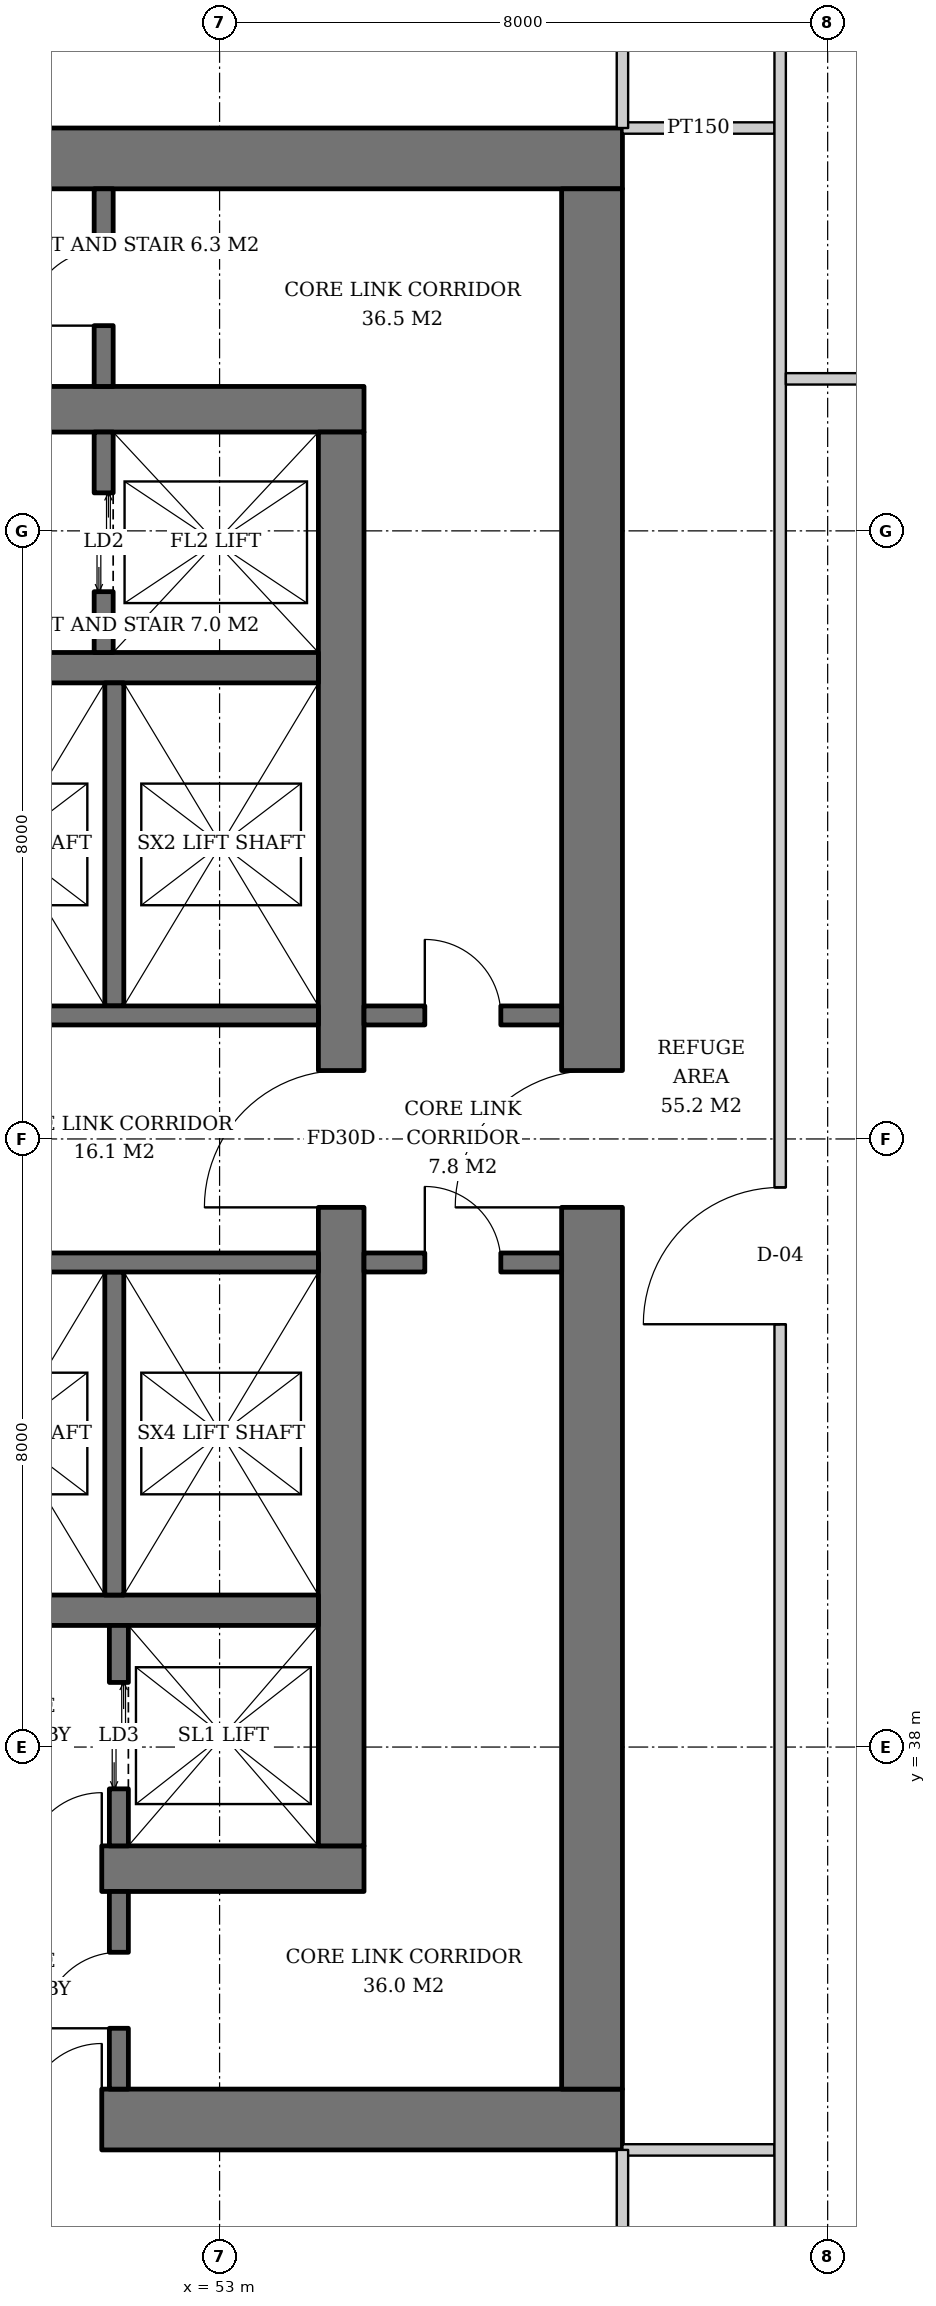
"""IFC4 building model, lengths in metres.
Left out: names, types, materials, properties, quantities, classifications, styles, units other than length and angle.
Written with IfcOpenShell. Run it as: python <this file> out.ifc"""

import sys

from ifc_helpers import new_model, si_unit, direction, frame, frame_2d, origin, place, context, subcontext, project, spatial, rectangle, extrude, element, fill, save


model = new_model("IFC4")
c1 = context("Model", 3, precision=1e-05, world=origin(), true_north=direction((0.0, 1.0)))
c2 = subcontext(c1, "Body", "Model", "MODEL_VIEW")
j1 = project(units=[si_unit("LENGTHUNIT", "METRE"), si_unit("PLANEANGLEUNIT", "RADIAN")], contexts=[c1])
p1 = place(None, origin())
s1 = spatial("IfcSite", under=j1, at=p1, CompositionType="ELEMENT")
p2 = place(p1, origin())
s2 = spatial("IfcBuilding", under=s1, at=p2, CompositionType="ELEMENT")
p3 = place(p2, frame((0.0, 0.0, 85.6)))
s3 = spatial("IfcBuildingStorey", under=s2, at=p3, CompositionType="ELEMENT", Elevation=85.6)
p4 = place(p3, frame((35.1, 36.4, 0.0), z_axis=(0.0, 0.0, 1.0), x_axis=(1.0, 0.0, 0.0)))
e1 = element("IfcWall", 1, at=p4, inside=s3, PredefinedType="SHEAR", context=c2, shape_type="SweptSolid", body=[
    extrude(rectangle(XDim=19.8, YDim=0.6, at=frame_2d((9.9, 0.0))), origin(), (0.0, 0.0, 1.0), 3.8),
])
p5 = place(p4, frame((3.9, 0.0, 0.0)))
e2 = element("IfcOpeningElement", 2, at=p5, cuts=e1, PredefinedType="OPENING", context=c2, shape_type="SweptSolid", body=[
    extrude(rectangle(XDim=1.0, YDim=2.1, at=frame_2d((0.5, 1.05))), frame((0.0, 0.31, 0.0), z_axis=(0.0, -1.0, 0.0), x_axis=(1.0, 0.0, 0.0)), (0.0, 0.0, 1.0), 0.62),
])
p6 = place(p4, frame((15.35, 0.0, 0.0)))
e3 = element("IfcOpeningElement", 3, at=p6, cuts=e1, PredefinedType="OPENING", context=c2, shape_type="SweptSolid", body=[
    extrude(rectangle(XDim=1.0, YDim=2.1, at=frame_2d((0.5, 1.05))), frame((0.0, 0.31, 0.0), z_axis=(0.0, -1.0, 0.0), x_axis=(1.0, 0.0, 0.0)), (0.0, 0.0, 1.0), 0.62),
])
p7 = place(p3, frame((35.1, 55.6, 0.0), z_axis=(0.0, 0.0, 1.0), x_axis=(1.0, 0.0, 0.0)))
e4 = element("IfcWall", 4, at=p7, inside=s3, PredefinedType="SHEAR", context=c2, shape_type="SweptSolid", body=[
    extrude(rectangle(XDim=19.8, YDim=0.6, at=frame_2d((9.9, 0.0))), origin(), (0.0, 0.0, 1.0), 3.8),
])
p8 = place(p7, frame((14.54, 0.0, 0.0)))
e5 = element("IfcOpeningElement", 5, at=p8, cuts=e4, PredefinedType="OPENING", context=c2, shape_type="SweptSolid", body=[
    extrude(rectangle(XDim=1.0, YDim=2.1, at=frame_2d((0.5, 1.05))), frame((0.0, 0.31, 0.0), z_axis=(0.0, -1.0, 0.0), x_axis=(1.0, 0.0, 0.0)), (0.0, 0.0, 1.0), 0.62),
])
p9 = place(p7, frame((2.425, 0.0, 0.0)))
e6 = element("IfcOpeningElement", 6, at=p9, cuts=e4, PredefinedType="OPENING", context=c2, shape_type="SweptSolid", body=[
    extrude(rectangle(XDim=1.0, YDim=2.1, at=frame_2d((0.5, 1.05))), frame((0.0, 0.31, 0.0), z_axis=(0.0, -1.0, 0.0), x_axis=(1.0, 0.0, 0.0)), (0.0, 0.0, 1.0), 0.62),
])
p10 = place(p3, frame((54.6, 36.7, 0.0), z_axis=(0.0, 0.0, 1.0), x_axis=(0.0, 1.0, 0.0)))
e7 = element("IfcWall", 7, at=p10, inside=s3, PredefinedType="SHEAR", context=c2, shape_type="SweptSolid", body=[
    extrude(rectangle(XDim=18.6, YDim=0.6, at=frame_2d((9.3, 0.0))), origin(), (0.0, 0.0, 1.0), 3.8),
])
p11 = place(p10, frame((8.4, 0.0, 0.0)))
e8 = element("IfcOpeningElement", 8, at=p11, cuts=e7, PredefinedType="OPENING", context=c2, shape_type="SweptSolid", body=[
    extrude(rectangle(XDim=1.8, YDim=2.4, at=frame_2d((0.9, 1.2))), frame((0.0, 0.31, 0.0), z_axis=(0.0, -1.0, 0.0), x_axis=(1.0, 0.0, 0.0)), (0.0, 0.0, 1.0), 0.62),
])
p12 = place(p3, frame((31.7, 33.1, 0.0), z_axis=(0.0, 0.0, 1.0), x_axis=(1.0, 0.0, 0.0)))
e9 = element("IfcWall", 9, at=p12, inside=s3, PredefinedType="SHEAR", context=c2, shape_type="SweptSolid", body=[
    extrude(rectangle(XDim=26.6, YDim=0.8, at=frame_2d((13.3, 0.0))), origin(), (0.0, 0.0, 1.0), 3.8),
])
p13 = place(p12, frame((7.3, 0.0, 0.0)))
e10 = element("IfcOpeningElement", 10, at=p13, cuts=e9, PredefinedType="OPENING", context=c2, shape_type="SweptSolid", body=[
    extrude(rectangle(XDim=1.0, YDim=2.1, at=frame_2d((0.5, 1.05))), frame((0.0, 0.41, 0.0), z_axis=(0.0, -1.0, 0.0), x_axis=(1.0, 0.0, 0.0)), (0.0, 0.0, 1.0), 0.82),
])
p14 = place(p12, frame((18.75, 0.0, 0.0)))
e11 = element("IfcOpeningElement", 11, at=p14, cuts=e9, PredefinedType="OPENING", context=c2, shape_type="SweptSolid", body=[
    extrude(rectangle(XDim=1.0, YDim=2.1, at=frame_2d((0.5, 1.05))), frame((0.0, 0.41, 0.0), z_axis=(0.0, -1.0, 0.0), x_axis=(1.0, 0.0, 0.0)), (0.0, 0.0, 1.0), 0.82),
])
p15 = place(p12, frame((1.9, 0.0, 0.0)))
e12 = element("IfcOpeningElement", 12, at=p15, cuts=e9, PredefinedType="OPENING", context=c2, shape_type="SweptSolid", body=[
    extrude(rectangle(XDim=1.0, YDim=2.1, at=frame_2d((0.5, 1.05))), frame((0.0, 0.41, 0.0), z_axis=(0.0, -1.0, 0.0), x_axis=(1.0, 0.0, 0.0)), (0.0, 0.0, 1.0), 0.82),
])
p16 = place(p12, frame((4.725, 0.0, 0.0)))
e13 = element("IfcOpeningElement", 13, at=p16, cuts=e9, PredefinedType="OPENING", context=c2, shape_type="SweptSolid", body=[
    extrude(rectangle(XDim=1.0, YDim=2.1, at=frame_2d((0.5, 1.05))), frame((0.0, 0.41, 0.0), z_axis=(0.0, -1.0, 0.0), x_axis=(1.0, 0.0, 0.0)), (0.0, 0.0, 1.0), 0.82),
])
p17 = place(p3, frame((31.7, 58.9, 0.0), z_axis=(0.0, 0.0, 1.0), x_axis=(1.0, 0.0, 0.0)))
e14 = element("IfcWall", 14, at=p17, inside=s3, PredefinedType="SHEAR", context=c2, shape_type="SweptSolid", body=[
    extrude(rectangle(XDim=26.6, YDim=0.8, at=frame_2d((13.3, 0.0))), origin(), (0.0, 0.0, 1.0), 3.8),
])
p18 = place(p17, frame((17.94, 0.0, 0.0)))
e15 = element("IfcOpeningElement", 15, at=p18, cuts=e14, PredefinedType="OPENING", context=c2, shape_type="SweptSolid", body=[
    extrude(rectangle(XDim=1.0, YDim=2.1, at=frame_2d((0.5, 1.05))), frame((0.0, 0.41, 0.0), z_axis=(0.0, -1.0, 0.0), x_axis=(1.0, 0.0, 0.0)), (0.0, 0.0, 1.0), 0.82),
])
p19 = place(p17, frame((5.825, 0.0, 0.0)))
e16 = element("IfcOpeningElement", 16, at=p19, cuts=e14, PredefinedType="OPENING", context=c2, shape_type="SweptSolid", body=[
    extrude(rectangle(XDim=1.0, YDim=2.1, at=frame_2d((0.5, 1.05))), frame((0.0, 0.41, 0.0), z_axis=(0.0, -1.0, 0.0), x_axis=(1.0, 0.0, 0.0)), (0.0, 0.0, 1.0), 0.82),
])
p20 = place(p17, frame((2.637, 0.0, 0.0)))
e17 = element("IfcOpeningElement", 17, at=p20, cuts=e14, PredefinedType="OPENING", context=c2, shape_type="SweptSolid", body=[
    extrude(rectangle(XDim=1.0, YDim=2.1, at=frame_2d((0.5, 1.05))), frame((0.0, 0.41, 0.0), z_axis=(0.0, -1.0, 0.0), x_axis=(1.0, 0.0, 0.0)), (0.0, 0.0, 1.0), 0.82),
])
p21 = place(p3, frame((57.9, 33.5, 0.0), z_axis=(0.0, 0.0, 1.0), x_axis=(0.0, 1.0, 0.0)))
e18 = element("IfcWall", 18, at=p21, inside=s3, PredefinedType="SHEAR", context=c2, shape_type="SweptSolid", body=[
    extrude(rectangle(XDim=25.0, YDim=0.8, at=frame_2d((12.5, 0.0))), origin(), (0.0, 0.0, 1.0), 3.8),
])
p22 = place(p21, frame((11.6, 0.0, 0.0)))
e19 = element("IfcOpeningElement", 19, at=p22, cuts=e18, PredefinedType="OPENING", context=c2, shape_type="SweptSolid", body=[
    extrude(rectangle(XDim=1.8, YDim=2.4, at=frame_2d((0.9, 1.2))), frame((0.0, 0.41, 0.0), z_axis=(0.0, -1.0, 0.0), x_axis=(1.0, 0.0, 0.0)), (0.0, 0.0, 1.0), 0.82),
])
for number, where, z_axis, x_axis in (
    (20, (35.7, 39.8, 0.0), (0.0, 0.0, 1.0), (1.0, 0.0, 0.0)),
    (21, (35.7, 52.2, 0.0), (0.0, 0.0, 1.0), (1.0, 0.0, 0.0)),
):
    element("IfcWall", number, at=place(p3, frame(where, z_axis=z_axis, x_axis=x_axis)), inside=s3, PredefinedType="SHEAR", context=c2, shape_type="SweptSolid", body=[
        extrude(rectangle(XDim=18.6, YDim=0.4, at=frame_2d((9.3, 0.0))), origin(), (0.0, 0.0, 1.0), 3.8),
    ])
p23 = place(p3, frame((51.675, 36.7, 0.0), z_axis=(0.0, 0.0, 1.0), x_axis=(0.0, 1.0, 0.0)))
e22 = element("IfcWall", 22, at=p23, inside=s3, PredefinedType="SHEAR", context=c2, shape_type="SweptSolid", body=[
    extrude(rectangle(XDim=2.9, YDim=0.25, at=frame_2d((1.45, 0.0))), origin(), (0.0, 0.0, 1.0), 3.8),
])
p24 = place(p23, frame((0.75, 0.0, 0.0)))
e23 = element("IfcOpeningElement", 23, at=p24, cuts=e22, PredefinedType="OPENING", context=c2, shape_type="SweptSolid", body=[
    extrude(rectangle(XDim=1.4, YDim=2.4, at=frame_2d((0.7, 1.2))), frame((0.0, 0.135, 0.0), z_axis=(0.0, -1.0, 0.0), x_axis=(1.0, 0.0, 0.0)), (0.0, 0.0, 1.0), 0.27),
])
p25 = place(p3, frame((51.475, 52.4, 0.0), z_axis=(0.0, 0.0, 1.0), x_axis=(0.0, 1.0, 0.0)))
e24 = element("IfcWall", 24, at=p25, inside=s3, PredefinedType="SHEAR", context=c2, shape_type="SweptSolid", body=[
    extrude(rectangle(XDim=2.9, YDim=0.25, at=frame_2d((1.45, 0.0))), origin(), (0.0, 0.0, 1.0), 3.8),
])
p26 = place(p25, frame((0.8, 0.0, 0.0)))
e25 = element("IfcOpeningElement", 25, at=p26, cuts=e24, PredefinedType="OPENING", context=c2, shape_type="SweptSolid", body=[
    extrude(rectangle(XDim=1.3, YDim=2.2, at=frame_2d((0.65, 1.1))), frame((0.0, 0.135, 0.0), z_axis=(0.0, -1.0, 0.0), x_axis=(1.0, 0.0, 0.0)), (0.0, 0.0, 1.0), 0.27),
])
p27 = place(p3, frame((51.615, 47.75, 0.0), z_axis=(0.0, 0.0, 1.0), x_axis=(0.0, 1.0, 0.0)))
e26 = element("IfcWall", 26, at=p27, inside=s3, PredefinedType="SHEAR", context=c2, shape_type="SweptSolid", body=[
    extrude(rectangle(XDim=4.25, YDim=0.25, at=frame_2d((2.125, 0.0))), origin(), (0.0, 0.0, 1.0), 3.8),
])
p28 = place(p3, frame((48.93, 47.625, 0.0), z_axis=(0.0, 0.0, 1.0), x_axis=(1.0, 0.0, 0.0)))
e27 = element("IfcWall", 27, at=p28, inside=s3, PredefinedType="SHEAR", context=c2, shape_type="SweptSolid", body=[
    extrude(rectangle(XDim=5.37, YDim=0.25, at=frame_2d((2.685, 0.0))), origin(), (0.0, 0.0, 1.0), 3.8),
])
p29 = place(p3, frame((51.615, 44.25, 0.0), z_axis=(0.0, 0.0, 1.0), x_axis=(0.0, -1.0, 0.0)))
e28 = element("IfcWall", 28, at=p29, inside=s3, PredefinedType="SHEAR", context=c2, shape_type="SweptSolid", body=[
    extrude(rectangle(XDim=4.25, YDim=0.25, at=frame_2d((2.125, 0.0))), origin(), (0.0, 0.0, 1.0), 3.8),
])
p30 = place(p3, frame((48.93, 44.375, 0.0), z_axis=(0.0, 0.0, 1.0), x_axis=(1.0, 0.0, 0.0)))
e29 = element("IfcWall", 29, at=p30, inside=s3, PredefinedType="SHEAR", context=c2, shape_type="SweptSolid", body=[
    extrude(rectangle(XDim=5.37, YDim=0.25, at=frame_2d((2.685, 0.0))), origin(), (0.0, 0.0, 1.0), 3.8),
])
p31 = place(p3, frame((51.475, 55.9, 0.0), z_axis=(0.0, 0.0, 1.0), x_axis=(0.0, 1.0, 0.0)))
e30 = element("IfcWall", 30, at=p31, inside=s3, PredefinedType="SOLIDWALL", context=c2, shape_type="SweptSolid", body=[
    extrude(rectangle(XDim=2.6, YDim=0.25, at=frame_2d((1.3, 0.0))), origin(), (0.0, 0.0, 1.0), 3.6),
])
p32 = place(p31, frame((0.8, 0.0, 0.0)))
e31 = element("IfcOpeningElement", 31, at=p32, cuts=e30, PredefinedType="OPENING", context=c2, shape_type="SweptSolid", body=[
    extrude(rectangle(XDim=1.0, YDim=2.1, at=frame_2d((0.5, 1.05))), frame((0.0, 0.135, 0.0), z_axis=(0.0, -1.0, 0.0), x_axis=(1.0, 0.0, 0.0)), (0.0, 0.0, 1.0), 0.27),
])
p33 = place(p3, frame((54.9, 44.375, 0.0), z_axis=(0.0, 0.0, 1.0), x_axis=(1.0, 0.0, 0.0)))
e32 = element("IfcWall", 32, at=p33, inside=s3, PredefinedType="SOLIDWALL", context=c2, shape_type="SweptSolid", body=[
    extrude(rectangle(XDim=2.6, YDim=0.25, at=frame_2d((1.3, 0.0))), origin(), (0.0, 0.0, 1.0), 3.6),
])
p34 = place(p33, frame((0.8, 0.0, 0.0)))
e33 = element("IfcOpeningElement", 33, at=p34, cuts=e32, PredefinedType="OPENING", context=c2, shape_type="SweptSolid", body=[
    extrude(rectangle(XDim=1.0, YDim=2.1, at=frame_2d((0.5, 1.05))), frame((0.0, 0.135, 0.0), z_axis=(0.0, -1.0, 0.0), x_axis=(1.0, 0.0, 0.0)), (0.0, 0.0, 1.0), 0.27),
])
p35 = place(p3, frame((54.9, 47.625, 0.0), z_axis=(0.0, 0.0, 1.0), x_axis=(1.0, 0.0, 0.0)))
e34 = element("IfcWall", 34, at=p35, inside=s3, PredefinedType="SOLIDWALL", context=c2, shape_type="SweptSolid", body=[
    extrude(rectangle(XDim=2.6, YDim=0.25, at=frame_2d((1.3, 0.0))), origin(), (0.0, 0.0, 1.0), 3.6),
])
p36 = place(p35, frame((0.8, 0.0, 0.0)))
e35 = element("IfcOpeningElement", 35, at=p36, cuts=e34, PredefinedType="OPENING", context=c2, shape_type="SweptSolid", body=[
    extrude(rectangle(XDim=1.0, YDim=2.1, at=frame_2d((0.5, 1.05))), frame((0.0, 0.135, 0.0), z_axis=(0.0, -1.0, 0.0), x_axis=(1.0, 0.0, 0.0)), (0.0, 0.0, 1.0), 0.27),
])
p37 = place(p3, frame((51.675, 33.5, 0.0), z_axis=(0.0, 0.0, 1.0), x_axis=(0.0, 1.0, 0.0)))
e36 = element("IfcWall", 36, at=p37, inside=s3, PredefinedType="SOLIDWALL", context=c2, shape_type="SweptSolid", body=[
    extrude(rectangle(XDim=2.6, YDim=0.25, at=frame_2d((1.3, 0.0))), origin(), (0.0, 0.0, 1.0), 3.6),
])
p38 = place(p37, frame((0.8, 0.0, 0.0)))
e37 = element("IfcOpeningElement", 37, at=p38, cuts=e36, PredefinedType="OPENING", context=c2, shape_type="SweptSolid", body=[
    extrude(rectangle(XDim=1.0, YDim=2.1, at=frame_2d((0.5, 1.05))), frame((0.0, 0.135, 0.0), z_axis=(0.0, -1.0, 0.0), x_axis=(1.0, 0.0, 0.0)), (0.0, 0.0, 1.0), 0.27),
])
p39 = place(p3, frame((58.3, 59.3, 0.0), z_axis=(0.0, 0.0, 1.0), x_axis=(1.0, 0.0, 0.0)))
e38 = element("IfcWall", 38, at=p39, inside=s3, PredefinedType="PARTITIONING", context=c2, shape_type="SweptSolid", body=[
    extrude(rectangle(XDim=2.0, YDim=0.15, at=frame_2d((1.0, 0.0))), origin(), (0.0, 0.0, 1.0), 3.6),
])
p40 = place(p3, frame((58.3, 32.7, 0.0), z_axis=(0.0, 0.0, 1.0), x_axis=(1.0, 0.0, 0.0)))
e39 = element("IfcWall", 39, at=p40, inside=s3, PredefinedType="PARTITIONING", context=c2, shape_type="SweptSolid", body=[
    extrude(rectangle(XDim=2.0, YDim=0.15, at=frame_2d((1.0, 0.0))), origin(), (0.0, 0.0, 1.0), 2.592),
])
p41 = place(p3, frame((60.375, 30.55, 0.0), z_axis=(0.0, 0.0, 1.0), x_axis=(0.0, 1.0, 0.0)))
e40 = element("IfcWall", 40, at=p41, inside=s3, PredefinedType="PARTITIONING", context=c2, shape_type="SweptSolid", body=[
    extrude(rectangle(XDim=30.75, YDim=0.15, at=frame_2d((15.375, 0.0))), origin(), (0.0, 0.0, 1.0), 2.592),
])
p42 = place(p41, frame((13.012, 0.0, 0.0)))
e41 = element("IfcOpeningElement", 41, at=p42, cuts=e40, PredefinedType="OPENING", context=c2, shape_type="SweptSolid", body=[
    extrude(rectangle(XDim=1.8, YDim=2.4, at=frame_2d((0.9, 1.2))), frame((0.0, 0.085, 0.0), z_axis=(0.0, -1.0, 0.0), x_axis=(1.0, 0.0, 0.0)), (0.0, 0.0, 1.0), 0.17),
])
p43 = place(p3, frame((60.45, 56.0, 0.0), z_axis=(0.0, 0.0, 1.0), x_axis=(1.0, 0.0, 0.0)))
e42 = element("IfcWall", 42, at=p43, inside=s3, PredefinedType="PARTITIONING", context=c2, shape_type="SweptSolid", body=[
    extrude(rectangle(XDim=5.798, YDim=0.15, at=frame_2d((2.899, 0.0))), origin(), (0.0, 0.0, 1.0), 3.6),
])
p44 = place(p3, frame((58.3, 59.3, 0.0), z_axis=(0.0, 0.0, 1.0), x_axis=(0.0, 1.0, 0.0)))
e43 = element("IfcWall", 43, at=p44, inside=s3, PredefinedType="PARTITIONING", context=c2, shape_type="SweptSolid", body=[
    extrude(rectangle(XDim=2.0, YDim=0.15, at=frame_2d((1.0, 0.0))), origin(), (0.0, 0.0, 1.0), 2.592),
])
p45 = place(p3, frame((58.3, 32.7, 0.0), z_axis=(0.0, 0.0, 1.0), x_axis=(0.0, -1.0, 0.0)))
e44 = element("IfcWall", 44, at=p45, inside=s3, PredefinedType="PARTITIONING", context=c2, shape_type="SweptSolid", body=[
    extrude(rectangle(XDim=2.0, YDim=0.15, at=frame_2d((1.0, 0.0))), origin(), (0.0, 0.0, 1.0), 3.6),
])
p46 = place(p24, origin())
e45 = element("IfcDoor", 45, at=p46, inside=s3, OperationType="DOUBLE_DOOR_SLIDING", PredefinedType="DOOR", context=c2, shape_type="SweptSolid", body=[
    extrude(rectangle(XDim=1.4, YDim=2.4, at=frame_2d((0.7, 1.2))), frame((0.0, 0.025, 0.0), z_axis=(0.0, -1.0, 0.0), x_axis=(1.0, 0.0, 0.0)), (0.0, 0.0, 1.0), 0.05),
])
fill(e23, e45)
p47 = place(p26, origin())
e46 = element("IfcDoor", 46, at=p47, inside=s3, OperationType="DOUBLE_DOOR_SLIDING", PredefinedType="DOOR", context=c2, shape_type="SweptSolid", body=[
    extrude(rectangle(XDim=1.3, YDim=2.2, at=frame_2d((0.65, 1.1))), frame((0.0, 0.025, 0.0), z_axis=(0.0, -1.0, 0.0), x_axis=(1.0, 0.0, 0.0)), (0.0, 0.0, 1.0), 0.05),
])
fill(e25, e46)
p48 = place(p32, origin())
e47 = element("IfcDoor", 47, at=p48, inside=s3, OperationType="SINGLE_SWING_LEFT", PredefinedType="DOOR", context=c2, shape_type="SweptSolid", body=[
    extrude(rectangle(XDim=1.0, YDim=2.1, at=frame_2d((0.5, 1.05))), frame((0.0, 0.025, 0.0), z_axis=(0.0, -1.0, 0.0), x_axis=(1.0, 0.0, 0.0)), (0.0, 0.0, 1.0), 0.05),
])
fill(e31, e47)
p49 = place(p34, origin())
e48 = element("IfcDoor", 48, at=p49, inside=s3, OperationType="SINGLE_SWING_LEFT", PredefinedType="DOOR", context=c2, shape_type="SweptSolid", body=[
    extrude(rectangle(XDim=1.0, YDim=2.1, at=frame_2d((0.5, 1.05))), frame((0.0, 0.025, 0.0), z_axis=(0.0, -1.0, 0.0), x_axis=(1.0, 0.0, 0.0)), (0.0, 0.0, 1.0), 0.05),
])
fill(e33, e48)
p50 = place(p36, origin())
e49 = element("IfcDoor", 49, at=p50, inside=s3, OperationType="SINGLE_SWING_LEFT", PredefinedType="DOOR", context=c2, shape_type="SweptSolid", body=[
    extrude(rectangle(XDim=1.0, YDim=2.1, at=frame_2d((0.5, 1.05))), frame((0.0, 0.025, 0.0), z_axis=(0.0, -1.0, 0.0), x_axis=(1.0, 0.0, 0.0)), (0.0, 0.0, 1.0), 0.05),
])
fill(e35, e49)
p51 = place(p38, origin())
e50 = element("IfcDoor", 50, at=p51, inside=s3, OperationType="SINGLE_SWING_LEFT", PredefinedType="DOOR", context=c2, shape_type="SweptSolid", body=[
    extrude(rectangle(XDim=1.0, YDim=2.1, at=frame_2d((0.5, 1.05))), frame((0.0, 0.025, 0.0), z_axis=(0.0, -1.0, 0.0), x_axis=(1.0, 0.0, 0.0)), (0.0, 0.0, 1.0), 0.05),
])
fill(e37, e50)
p52 = place(p11, origin())
e51 = element("IfcDoor", 51, at=p52, inside=s3, OperationType="DOUBLE_DOOR_SINGLE_SWING", PredefinedType="DOOR", context=c2, shape_type="SweptSolid", body=[
    extrude(rectangle(XDim=1.8, YDim=2.4, at=frame_2d((0.9, 1.2))), frame((0.0, 0.025, 0.0), z_axis=(0.0, -1.0, 0.0), x_axis=(1.0, 0.0, 0.0)), (0.0, 0.0, 1.0), 0.05),
])
fill(e8, e51)
p53 = place(p6, origin())
e52 = element("IfcDoor", 52, at=p53, inside=s3, OperationType="SINGLE_SWING_RIGHT", PredefinedType="DOOR", context=c2, shape_type="SweptSolid", body=[
    extrude(rectangle(XDim=1.0, YDim=2.1, at=frame_2d((0.5, 1.05))), frame((0.0, 0.025, 0.0), z_axis=(0.0, -1.0, 0.0), x_axis=(1.0, 0.0, 0.0)), (0.0, 0.0, 1.0), 0.05),
])
fill(e3, e52)
p54 = place(p22, origin())
e53 = element("IfcDoor", 53, at=p54, inside=s3, OperationType="DOUBLE_DOOR_SINGLE_SWING", PredefinedType="DOOR", context=c2, shape_type="SweptSolid", body=[
    extrude(rectangle(XDim=1.8, YDim=2.4, at=frame_2d((0.9, 1.2))), frame((0.0, 0.025, 0.0), z_axis=(0.0, -1.0, 0.0), x_axis=(1.0, 0.0, 0.0)), (0.0, 0.0, 1.0), 0.05),
])
fill(e19, e53)
p55 = place(p14, origin())
e54 = element("IfcDoor", 54, at=p55, inside=s3, OperationType="SINGLE_SWING_RIGHT", PredefinedType="DOOR", context=c2, shape_type="SweptSolid", body=[
    extrude(rectangle(XDim=1.0, YDim=2.1, at=frame_2d((0.5, 1.05))), frame((0.0, 0.025, 0.0), z_axis=(0.0, -1.0, 0.0), x_axis=(1.0, 0.0, 0.0)), (0.0, 0.0, 1.0), 0.05),
])
fill(e11, e54)
p56 = place(p42, origin())
e55 = element("IfcDoor", 55, at=p56, inside=s3, OperationType="DOUBLE_DOOR_SINGLE_SWING", PredefinedType="DOOR", context=c2, shape_type="SweptSolid", body=[
    extrude(rectangle(XDim=1.8, YDim=2.4, at=frame_2d((0.9, 1.2))), frame((0.0, 0.025, 0.0), z_axis=(0.0, -1.0, 0.0), x_axis=(1.0, 0.0, 0.0)), (0.0, 0.0, 1.0), 0.05),
])
fill(e41, e55)
save(model, sys.argv[1])
